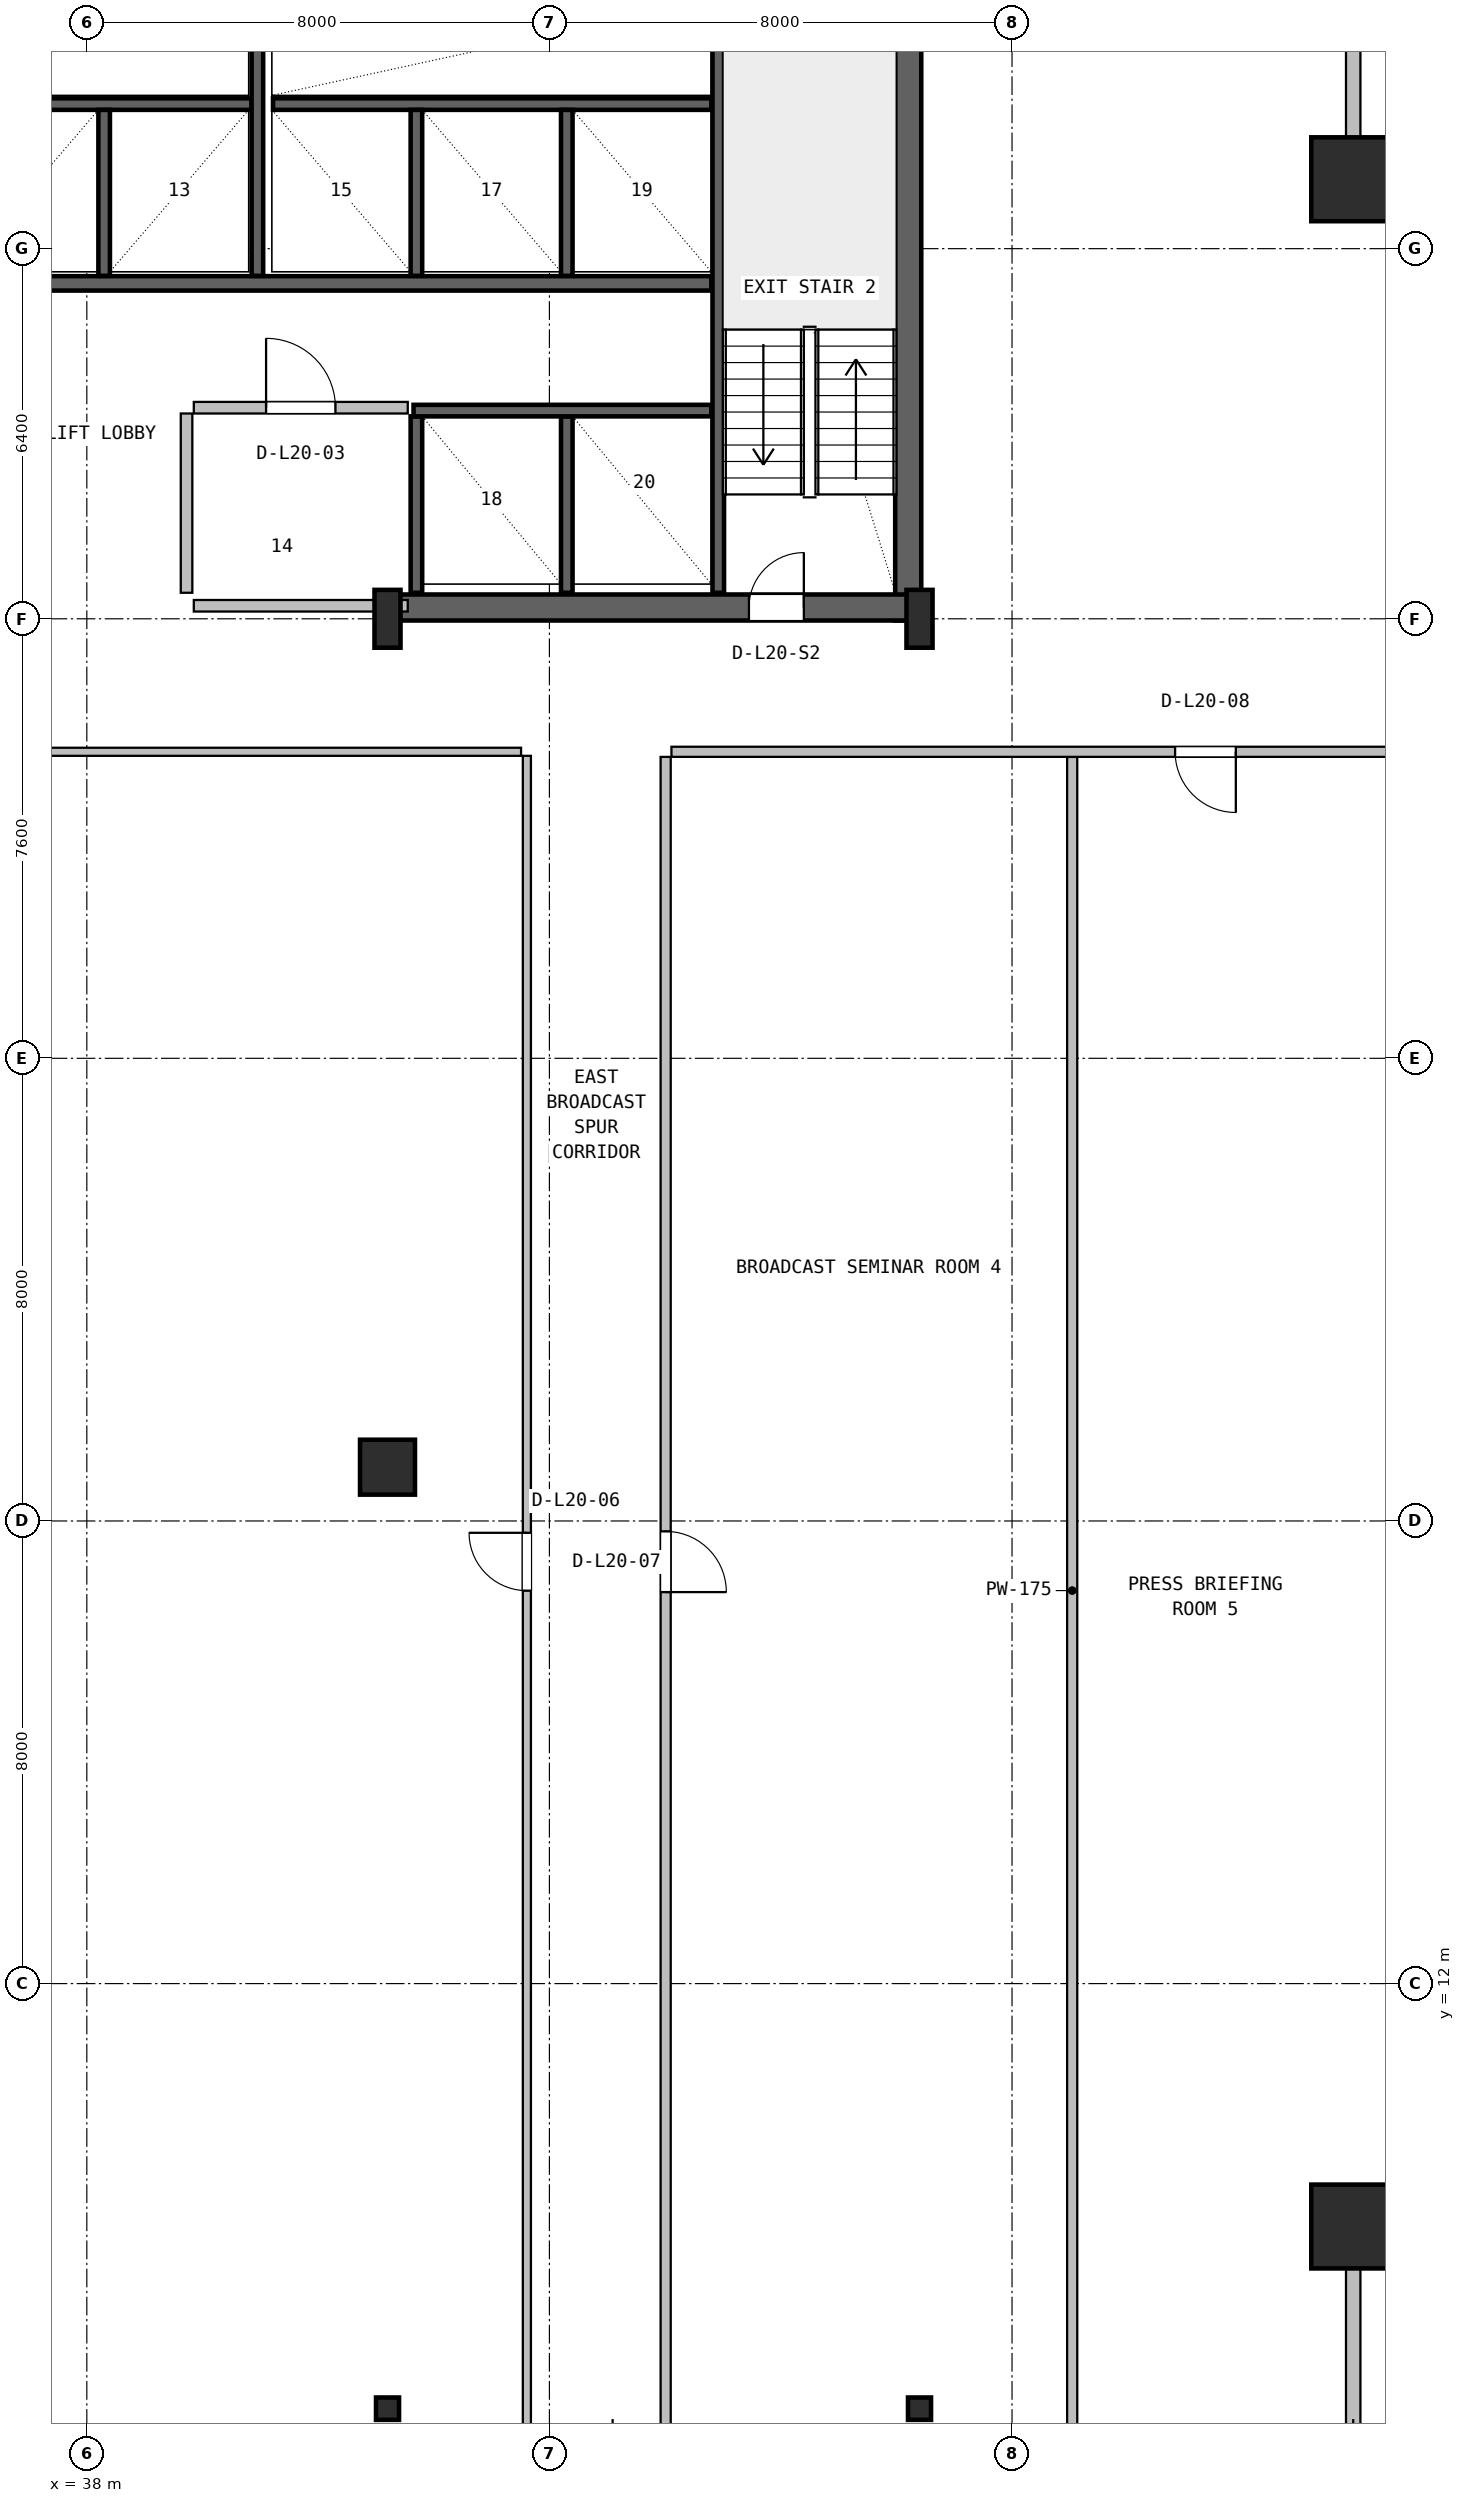
"""IFC4 building model, lengths in metres.
Left out: names, types, materials, properties, quantities, classifications, styles, units other than length and angle.
Written with IfcOpenShell. Run it as: python <this file> out.ifc"""

import sys

from ifc_helpers import new_model, si_unit, direction, frame, frame_2d, origin, origin_2d, place, context, subcontext, project, spatial, rectangle, hollow_rectangle, i_section, extrude, source, transform, mapped, element, fill, save


model = new_model("IFC4")
c1 = context("Model", 3, precision=1e-05, world=origin(), true_north=direction((0.0, 1.0)))
c2 = subcontext(c1, "Body", "Model", "MODEL_VIEW")
j1 = project(units=[si_unit("LENGTHUNIT", "METRE"), si_unit("PLANEANGLEUNIT", "RADIAN")], contexts=[c1])
p1 = place(None, origin())
s1 = spatial("IfcSite", under=j1, at=p1, CompositionType="ELEMENT")
p2 = place(p1, origin())
s2 = spatial("IfcBuilding", under=s1, at=p2, CompositionType="ELEMENT")
p3 = place(p2, frame((0.0, 0.0, 87.0)))
s3 = spatial("IfcBuildingStorey", under=s2, at=p3, CompositionType="ELEMENT", Elevation=87.0)
p4 = place(p3, frame((52.205, 35.57, 0.0), z_axis=(0.0, 0.0, 1.0), x_axis=(0.0, 1.0, 0.0)))
e1 = element("IfcWall", 1, at=p4, inside=s3, PredefinedType="SHEAR", context=c2, shape_type="SweptSolid", body=[
    extrude(rectangle(XDim=11.23, YDim=0.45, at=frame_2d((5.615, 0.0))), origin(), (0.0, 0.0, 1.0), 3.55),
])
p5 = place(p3, frame((43.2, 35.795, 0.0), z_axis=(0.0, 0.0, 1.0), x_axis=(1.0, 0.0, 0.0)))
e2 = element("IfcWall", 2, at=p5, inside=s3, PredefinedType="SHEAR", context=c2, shape_type="SweptSolid", body=[
    extrude(rectangle(XDim=9.23, YDim=0.45, at=frame_2d((4.615, 0.0))), origin(), (0.0, 0.0, 1.0), 3.55),
])
p6 = place(p5, frame((6.25, 0.0, 0.0)))
e3 = element("IfcOpeningElement", 3, at=p6, cuts=e2, PredefinedType="OPENING", context=c2, shape_type="SweptSolid", body=[
    extrude(rectangle(XDim=0.95, YDim=2.1, at=frame_2d((0.475, 1.05))), frame((0.0, 0.235, 0.0), z_axis=(0.0, -1.0, 0.0), x_axis=(1.0, 0.0, 0.0)), (0.0, 0.0, 1.0), 0.47),
])
m1 = source(origin(), c2, "Body", "SweptSolid", [
    extrude(i_section(OverallWidth=0.45, OverallDepth=1.0, WebThickness=0.016, FlangeThickness=0.03, FilletRadius=0.016, at=origin_2d()), origin(), (0.0, 0.0, 1.0), 3.8),
])
for number, where, z_axis, x_axis in (
    (4, (43.2, 35.6, 0.0), (0.0, 0.0, 1.0), (1.0, 0.0, 0.0)),
    (5, (52.4, 35.6, 0.0), (0.0, 0.0, 1.0), (1.0, 0.0, 0.0)),
):
    element("IfcColumn", number, at=place(p3, frame(where, z_axis=z_axis, x_axis=x_axis)), inside=s3, PredefinedType="COLUMN", context=c2, shape_type="MappedRepresentation", body=[
        mapped(m1, transform((0.0, 0.0, 0.0), x_axis=(1.0, 0.0, 0.0), y_axis=(0.0, 1.0, 0.0), z_axis=(0.0, 0.0, 1.0), scale=1.0)),
    ])
m2 = source(origin(), c2, "Body", "SweptSolid", [
    extrude(hollow_rectangle(XDim=1.45, YDim=1.45, WallThickness=0.055, at=origin_2d()), origin(), (0.0, 0.0, 1.0), 3.8),
])
for number, where, z_axis, x_axis in (
    (6, (59.9, 7.8, 0.0), (0.0, 0.0, 1.0), (1.0, 0.0, 0.0)),
    (7, (59.9, 43.2, 0.0), (0.0, 0.0, 1.0), (1.0, 0.0, 0.0)),
):
    element("IfcColumn", number, at=place(p3, frame(where, z_axis=z_axis, x_axis=x_axis)), inside=s3, PredefinedType="COLUMN", context=c2, shape_type="MappedRepresentation", body=[
        mapped(m2, transform((0.0, 0.0, 0.0), x_axis=(1.0, 0.0, 0.0), y_axis=(0.0, 1.0, 0.0), z_axis=(0.0, 0.0, 1.0), scale=1.0)),
    ])
m3 = source(origin(), c2, "Body", "SweptSolid", [
    extrude(i_section(OverallWidth=0.398, OverallDepth=0.387, WebThickness=0.021, FlangeThickness=0.033, FilletRadius=0.018, at=origin_2d()), origin(), (0.0, 0.0, 1.0), 3.8),
])
for number, where, z_axis, x_axis in (
    (8, (43.2, 4.65, 0.0), (0.0, 0.0, 1.0), (1.0, 0.0, 0.0)),
    (9, (52.4, 4.65, 0.0), (0.0, 0.0, 1.0), (1.0, 0.0, 0.0)),
):
    element("IfcColumn", number, at=place(p3, frame(where, z_axis=z_axis, x_axis=x_axis)), inside=s3, PredefinedType="COLUMN", context=c2, shape_type="MappedRepresentation", body=[
        mapped(m3, transform((0.0, 0.0, 0.0), x_axis=(1.0, 0.0, 0.0), y_axis=(0.0, 1.0, 0.0), z_axis=(0.0, 0.0, 1.0), scale=1.0)),
    ])
m4 = source(origin(), c2, "Body", "SweptSolid", [
    extrude(rectangle(XDim=0.95, YDim=0.95, at=origin_2d()), origin(), (0.0, 0.0, 1.0), 3.8),
])
p7 = place(p3, frame((43.2, 20.93, 0.0), z_axis=(0.0, 0.0, 1.0), x_axis=(1.0, 0.0, 0.0)))
e10 = element("IfcColumn", 10, at=p7, inside=s3, PredefinedType="COLUMN", context=c2, shape_type="MappedRepresentation", body=[
    mapped(m4, transform((0.0, 0.0, 0.0), x_axis=(1.0, 0.0, 0.0), y_axis=(0.0, 1.0, 0.0), z_axis=(0.0, 0.0, 1.0), scale=1.0)),
])
p8 = place(p3, frame((59.9, 4.28, 0.0), z_axis=(0.0, 0.0, 1.0), x_axis=(0.0, 1.0, 0.0)))
e11 = element("IfcWall", 11, at=p8, inside=s3, PredefinedType="SOLIDWALL", context=c2, shape_type="SweptSolid", body=[
    extrude(rectangle(XDim=3.6, YDim=0.25, at=frame_2d((1.8, 0.0))), origin(), (0.0, 0.0, 1.0), 3.108),
])
p9 = place(p3, frame((60.03, 43.2, 0.0), z_axis=(0.0, 0.0, 1.0), x_axis=(1.0, 0.0, 0.0)))
e12 = element("IfcWall", 12, at=p9, inside=s3, PredefinedType="SOLIDWALL", context=c2, shape_type="SweptSolid", body=[
    extrude(rectangle(XDim=3.39, YDim=0.25, at=frame_2d((1.695, 0.0))), origin(), (0.0, 0.0, 1.0), 3.53),
])
p10 = place(p3, frame((59.9, 43.12, 0.0), z_axis=(0.0, 0.0, 1.0), x_axis=(0.0, 1.0, 0.0)))
e13 = element("IfcWall", 13, at=p10, inside=s3, PredefinedType="SOLIDWALL", context=c2, shape_type="SweptSolid", body=[
    extrude(rectangle(XDim=3.6, YDim=0.25, at=frame_2d((1.8, 0.0))), origin(), (0.0, 0.0, 1.0), 3.108),
])
p11 = place(p3, frame((48.92, 36.05, 0.0), z_axis=(0.0, 0.0, 1.0), x_axis=(0.0, 1.0, 0.0)))
e14 = element("IfcWall", 14, at=p11, inside=s3, PredefinedType="SHEAR", context=c2, shape_type="SweptSolid", body=[
    extrude(rectangle(XDim=10.5, YDim=0.2, at=frame_2d((5.25, 0.0))), origin(), (0.0, 0.0, 1.0), 3.55),
])
p12 = place(p3, frame((24.98, 41.4, 0.0), z_axis=(0.0, 0.0, 1.0), x_axis=(1.0, 0.0, 0.0)))
e15 = element("IfcWall", 15, at=p12, inside=s3, PredefinedType="SHEAR", context=c2, shape_type="SweptSolid", body=[
    extrude(rectangle(XDim=23.82, YDim=0.25, at=frame_2d((11.91, 0.0))), origin(), (0.0, 0.0, 1.0), 3.55),
])
p13 = place(p12, frame((0.87, 0.0, 0.0)))
e16 = element("IfcOpeningElement", 16, at=p13, cuts=e15, PredefinedType="OPENING", context=c2, shape_type="SweptSolid", body=[
    extrude(rectangle(XDim=1.1, YDim=2.18, at=frame_2d((0.55, 1.09))), frame((0.0, 0.135, 0.0), z_axis=(0.0, -1.0, 0.0), x_axis=(1.0, 0.0, 0.0)), (0.0, 0.0, 1.0), 0.27),
])
p14 = place(p12, frame((3.47, 0.0, 0.0)))
e17 = element("IfcOpeningElement", 17, at=p14, cuts=e15, PredefinedType="OPENING", context=c2, shape_type="SweptSolid", body=[
    extrude(rectangle(XDim=1.1, YDim=2.18, at=frame_2d((0.55, 1.09))), frame((0.0, 0.135, 0.0), z_axis=(0.0, -1.0, 0.0), x_axis=(1.0, 0.0, 0.0)), (0.0, 0.0, 1.0), 0.27),
])
p15 = place(p12, frame((6.07, 0.0, 0.0)))
e18 = element("IfcOpeningElement", 18, at=p15, cuts=e15, PredefinedType="OPENING", context=c2, shape_type="SweptSolid", body=[
    extrude(rectangle(XDim=1.1, YDim=2.18, at=frame_2d((0.55, 1.09))), frame((0.0, 0.135, 0.0), z_axis=(0.0, -1.0, 0.0), x_axis=(1.0, 0.0, 0.0)), (0.0, 0.0, 1.0), 0.27),
])
p16 = place(p3, frame((33.22, 44.5, 0.0), z_axis=(0.0, 0.0, 1.0), x_axis=(1.0, 0.0, 0.0)))
e19 = element("IfcWall", 19, at=p16, inside=s3, PredefinedType="SHEAR", context=c2, shape_type="SweptSolid", body=[
    extrude(rectangle(XDim=7.63, YDim=0.2, at=frame_2d((3.815, 0.0))), origin(), (0.0, 0.0, 1.0), 3.55),
])
p17 = place(p3, frame((38.3, 41.53, 0.0), z_axis=(0.0, 0.0, 1.0), x_axis=(0.0, 1.0, 0.0)))
e20 = element("IfcWall", 20, at=p17, inside=s3, PredefinedType="SHEAR", context=c2, shape_type="SweptSolid", body=[
    extrude(rectangle(XDim=2.87, YDim=0.2, at=frame_2d((1.435, 0.0))), origin(), (0.0, 0.0, 1.0), 3.55),
])
p18 = place(p3, frame((40.95, 41.53, 0.0), z_axis=(0.0, 0.0, 1.0), x_axis=(0.0, 1.0, 0.0)))
e21 = element("IfcWall", 21, at=p18, inside=s3, PredefinedType="SHEAR", context=c2, shape_type="SweptSolid", body=[
    extrude(rectangle(XDim=5.02, YDim=0.2, at=frame_2d((2.51, 0.0))), origin(), (0.0, 0.0, 1.0), 3.55),
])
p19 = place(p3, frame((41.22, 44.5, 0.0), z_axis=(0.0, 0.0, 1.0), x_axis=(1.0, 0.0, 0.0)))
e22 = element("IfcWall", 22, at=p19, inside=s3, PredefinedType="SHEAR", context=c2, shape_type="SweptSolid", body=[
    extrude(rectangle(XDim=7.58, YDim=0.2, at=frame_2d((3.79, 0.0))), origin(), (0.0, 0.0, 1.0), 3.55),
])
for number, where, z_axis, x_axis in (
    (23, (43.7, 41.53, 0.0), (0.0, 0.0, 1.0), (0.0, 1.0, 0.0)),
    (24, (46.3, 41.53, 0.0), (0.0, 0.0, 1.0), (0.0, 1.0, 0.0)),
):
    element("IfcWall", number, at=place(p3, frame(where, z_axis=z_axis, x_axis=x_axis)), inside=s3, PredefinedType="SHEAR", context=c2, shape_type="SweptSolid", body=[
        extrude(rectangle(XDim=2.87, YDim=0.2, at=frame_2d((1.435, 0.0))), origin(), (0.0, 0.0, 1.0), 3.55),
    ])
for number, where, z_axis, x_axis in (
    (25, (43.7, 36.05, 0.0), (0.0, 0.0, 1.0), (0.0, 1.0, 0.0)),
    (26, (46.3, 36.05, 0.0), (0.0, 0.0, 1.0), (0.0, 1.0, 0.0)),
):
    element("IfcWall", number, at=place(p3, frame(where, z_axis=z_axis, x_axis=x_axis)), inside=s3, PredefinedType="SHEAR", context=c2, shape_type="SweptSolid", body=[
        extrude(rectangle(XDim=3.05, YDim=0.2, at=frame_2d((1.525, 0.0))), origin(), (0.0, 0.0, 1.0), 3.55),
    ])
p20 = place(p3, frame((43.65, 39.2, 0.0), z_axis=(0.0, 0.0, 1.0), x_axis=(1.0, 0.0, 0.0)))
e27 = element("IfcWall", 27, at=p20, inside=s3, PredefinedType="SHEAR", context=c2, shape_type="SweptSolid", body=[
    extrude(rectangle(XDim=5.15, YDim=0.2, at=frame_2d((2.575, 0.0))), origin(), (0.0, 0.0, 1.0), 3.55),
])
p21 = place(p3, frame((39.85, 35.825, 0.0), z_axis=(0.0, 0.0, 1.0), x_axis=(1.0, 0.0, 0.0)))
e28 = element("IfcWall", 28, at=p21, inside=s3, PredefinedType="SOLIDWALL", context=c2, shape_type="SweptSolid", body=[
    extrude(rectangle(XDim=3.7, YDim=0.2, at=frame_2d((1.85, 0.0))), origin(), (0.0, 0.0, 1.0), 2.325),
])
p22 = place(p3, frame((39.85, 39.25, 0.0), z_axis=(0.0, 0.0, 1.0), x_axis=(1.0, 0.0, 0.0)))
e29 = element("IfcWall", 29, at=p22, inside=s3, PredefinedType="SOLIDWALL", context=c2, shape_type="SweptSolid", body=[
    extrude(rectangle(XDim=3.7, YDim=0.2, at=frame_2d((1.85, 0.0))), origin(), (0.0, 0.0, 1.0), 3.53),
])
p23 = place(p22, frame((1.25, 0.0, 0.0)))
e30 = element("IfcOpeningElement", 30, at=p23, cuts=e29, PredefinedType="OPENING", context=c2, shape_type="SweptSolid", body=[
    extrude(rectangle(XDim=1.2, YDim=2.1, at=frame_2d((0.6, 1.05))), frame((0.0, 0.11, 0.0), z_axis=(0.0, -1.0, 0.0), x_axis=(1.0, 0.0, 0.0)), (0.0, 0.0, 1.0), 0.22),
])
p24 = place(p3, frame((39.725, 36.05, 0.0), z_axis=(0.0, 0.0, 1.0), x_axis=(0.0, 1.0, 0.0)))
e31 = element("IfcWall", 31, at=p24, inside=s3, PredefinedType="SOLIDWALL", context=c2, shape_type="SweptSolid", body=[
    extrude(rectangle(XDim=3.1, YDim=0.2, at=frame_2d((1.55, 0.0))), origin(), (0.0, 0.0, 1.0), 3.53),
])
p25 = place(p3, frame((45.61, 4.38, 0.0), z_axis=(0.0, 0.0, 1.0), x_axis=(0.0, 1.0, 0.0)))
e32 = element("IfcWall", 32, at=p25, inside=s3, PredefinedType="PARTITIONING", context=c2, shape_type="SweptSolid", body=[
    extrude(rectangle(XDim=28.85, YDim=0.14, at=frame_2d((14.425, 0.0))), origin(), (0.0, 0.0, 1.0), 3.108),
])
p26 = place(p25, frame((14.415, 0.0, 0.0)))
e33 = element("IfcOpeningElement", 33, at=p26, cuts=e32, PredefinedType="OPENING", context=c2, shape_type="SweptSolid", body=[
    extrude(rectangle(XDim=1.0, YDim=2.1, at=frame_2d((0.5, 1.05))), frame((0.0, 0.08, 0.0), z_axis=(0.0, -1.0, 0.0), x_axis=(1.0, 0.0, 0.0)), (0.0, 0.0, 1.0), 0.16),
])
p27 = place(p3, frame((22.68, 33.3, 0.0), z_axis=(0.0, 0.0, 1.0), x_axis=(1.0, 0.0, 0.0)))
e34 = element("IfcWall", 34, at=p27, inside=s3, PredefinedType="PARTITIONING", context=c2, shape_type="SweptSolid", body=[
    extrude(rectangle(XDim=22.83, YDim=0.14, at=frame_2d((11.415, 0.0))), origin(), (0.0, 0.0, 1.0), 2.83),
])
p28 = place(p3, frame((55.04, 4.38, 0.0), z_axis=(0.0, 0.0, 1.0), x_axis=(0.0, 1.0, 0.0)))
e35 = element("IfcWall", 35, at=p28, inside=s3, PredefinedType="PARTITIONING", context=c2, shape_type="SweptSolid", body=[
    extrude(rectangle(XDim=28.832, YDim=0.175, at=frame_2d((14.416, 0.0))), origin(), (0.0, 0.0, 1.0), 3.108),
])
p29 = place(p3, frame((48.11, 33.3, 0.0), z_axis=(0.0, 0.0, 1.0), x_axis=(1.0, 0.0, 0.0)))
e36 = element("IfcWall", 36, at=p29, inside=s3, PredefinedType="PARTITIONING", context=c2, shape_type="SweptSolid", body=[
    extrude(rectangle(XDim=15.21, YDim=0.175, at=frame_2d((7.605, 0.0))), origin(), (0.0, 0.0, 1.0), 3.108),
])
p30 = place(p29, frame((8.71, 0.0, 0.0)))
e37 = element("IfcOpeningElement", 37, at=p30, cuts=e36, PredefinedType="OPENING", context=c2, shape_type="SweptSolid", body=[
    extrude(rectangle(XDim=1.05, YDim=2.1, at=frame_2d((0.525, 1.05))), frame((0.0, 0.098, 0.0), z_axis=(0.0, -1.0, 0.0), x_axis=(1.0, 0.0, 0.0)), (0.0, 0.0, 1.0), 0.195),
])
p31 = place(p3, frame((48.01, 4.38, 0.0), z_axis=(0.0, 0.0, 1.0), x_axis=(0.0, 1.0, 0.0)))
e38 = element("IfcWall", 38, at=p31, inside=s3, PredefinedType="PARTITIONING", context=c2, shape_type="SweptSolid", body=[
    extrude(rectangle(XDim=28.832, YDim=0.175, at=frame_2d((14.416, 0.0))), origin(), (0.0, 0.0, 1.0), 3.108),
])
p32 = place(p31, frame((14.39, 0.0, 0.0)))
e39 = element("IfcOpeningElement", 39, at=p32, cuts=e38, PredefinedType="OPENING", context=c2, shape_type="SweptSolid", body=[
    extrude(rectangle(XDim=1.05, YDim=2.1, at=frame_2d((0.525, 1.05))), frame((0.0, 0.098, 0.0), z_axis=(0.0, -1.0, 0.0), x_axis=(1.0, 0.0, 0.0)), (0.0, 0.0, 1.0), 0.195),
])
m5 = source(origin(), c2, "Body", "SweptSolid", [
    extrude(rectangle(XDim=0.95, YDim=2.1, at=frame_2d((0.475, 1.05))), frame((0.0, 0.025, 0.0), z_axis=(0.0, -1.0, 0.0), x_axis=(1.0, 0.0, 0.0)), (0.0, 0.0, 1.0), 0.05),
])
p33 = place(p6, origin())
e40 = element("IfcDoor", 40, at=p33, inside=s3, OperationType="SINGLE_SWING_RIGHT", PredefinedType="DOOR", context=c2, shape_type="MappedRepresentation", body=[
    mapped(m5, transform((0.0, 0.0, 0.0), x_axis=(1.0, 0.0, 0.0), y_axis=(0.0, 1.0, 0.0), z_axis=(0.0, 0.0, 1.0), scale=1.0)),
])
fill(e3, e40)
m6 = source(origin(), c2, "Body", "SweptSolid", [
    extrude(rectangle(XDim=1.2, YDim=2.1, at=frame_2d((0.6, 1.05))), frame((0.0, 0.025, 0.0), z_axis=(0.0, -1.0, 0.0), x_axis=(1.0, 0.0, 0.0)), (0.0, 0.0, 1.0), 0.05),
])
p34 = place(p23, origin())
e41 = element("IfcDoor", 41, at=p34, inside=s3, OperationType="SINGLE_SWING_LEFT", PredefinedType="DOOR", context=c2, shape_type="MappedRepresentation", body=[
    mapped(m6, transform((0.0, 0.0, 0.0), x_axis=(1.0, 0.0, 0.0), y_axis=(0.0, 1.0, 0.0), z_axis=(0.0, 0.0, 1.0), scale=1.0)),
])
fill(e30, e41)
m7 = source(origin(), c2, "Body", "SweptSolid", [
    extrude(rectangle(XDim=1.0, YDim=2.1, at=frame_2d((0.5, 1.05))), frame((0.0, 0.025, 0.0), z_axis=(0.0, -1.0, 0.0), x_axis=(1.0, 0.0, 0.0)), (0.0, 0.0, 1.0), 0.05),
])
p35 = place(p26, origin())
e42 = element("IfcDoor", 42, at=p35, inside=s3, OperationType="SINGLE_SWING_RIGHT", PredefinedType="DOOR", context=c2, shape_type="MappedRepresentation", body=[
    mapped(m7, transform((0.0, 0.0, 0.0), x_axis=(1.0, 0.0, 0.0), y_axis=(0.0, 1.0, 0.0), z_axis=(0.0, 0.0, 1.0), scale=1.0)),
])
fill(e33, e42)
m8 = source(origin(), c2, "Body", "SweptSolid", [
    extrude(rectangle(XDim=1.05, YDim=2.1, at=frame_2d((0.525, 1.05))), frame((0.0, 0.025, 0.0), z_axis=(0.0, -1.0, 0.0), x_axis=(1.0, 0.0, 0.0)), (0.0, 0.0, 1.0), 0.05),
])
p36 = place(p32, frame((1.05, 0.0, 0.0), z_axis=(0.0, 0.0, 1.0), x_axis=(-1.0, 0.0, 0.0)))
e43 = element("IfcDoor", 43, at=p36, inside=s3, OperationType="SINGLE_SWING_LEFT", PredefinedType="DOOR", context=c2, shape_type="MappedRepresentation", body=[
    mapped(m8, transform((0.0, 0.0, 0.0), x_axis=(1.0, 0.0, 0.0), y_axis=(0.0, 1.0, 0.0), z_axis=(0.0, 0.0, 1.0), scale=1.0)),
])
fill(e39, e43)
p37 = place(p30, frame((1.05, 0.0, 0.0), z_axis=(0.0, 0.0, 1.0), x_axis=(-1.0, 0.0, 0.0)))
e44 = element("IfcDoor", 44, at=p37, inside=s3, OperationType="SINGLE_SWING_RIGHT", PredefinedType="DOOR", context=c2, shape_type="MappedRepresentation", body=[
    mapped(m8, transform((0.0, 0.0, 0.0), x_axis=(1.0, 0.0, 0.0), y_axis=(0.0, 1.0, 0.0), z_axis=(0.0, 0.0, 1.0), scale=1.0)),
])
fill(e37, e44)
save(model, sys.argv[1])
